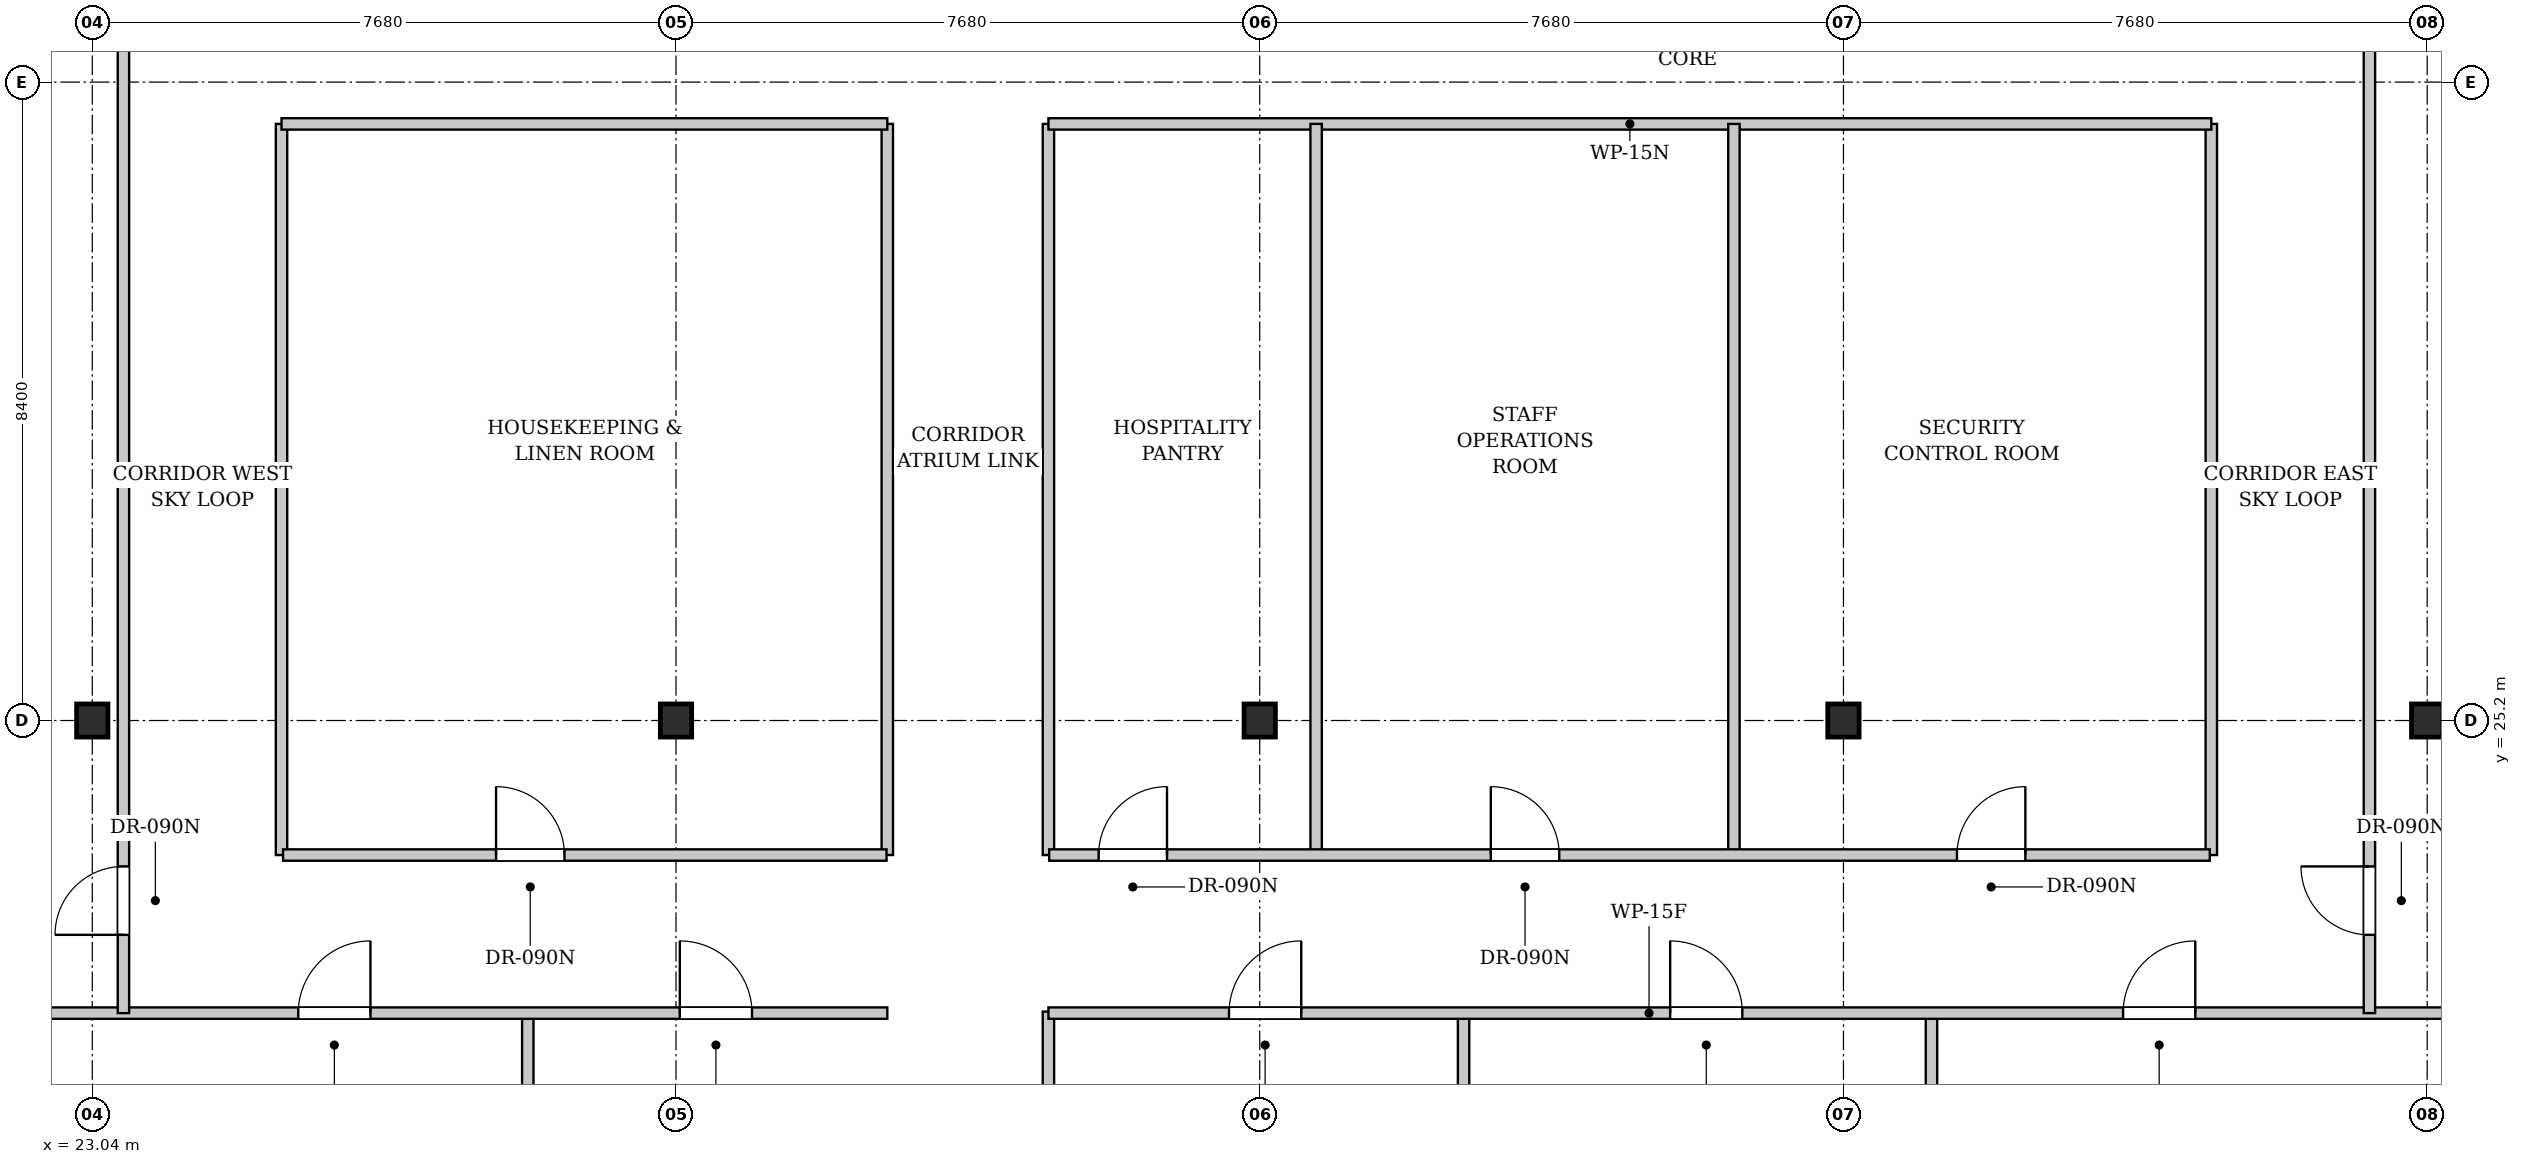
"""IFC4 building model, lengths in metres.
Left out: names, types, materials, properties, quantities, classifications, styles, units other than length and angle.
Written with IfcOpenShell. Run it as: python <this file> out.ifc"""

import sys

from ifc_helpers import new_model, si_unit, direction, frame, frame_2d, origin, origin_2d, place, context, subcontext, project, spatial, rectangle, i_section, extrude, element, fill, save


model = new_model("IFC4")
c1 = context("Model", 3, precision=1e-05, world=origin(), true_north=direction((0.0, 1.0)))
c2 = subcontext(c1, "Body", "Model", "MODEL_VIEW")
j1 = project(units=[si_unit("LENGTHUNIT", "METRE"), si_unit("PLANEANGLEUNIT", "RADIAN")], contexts=[c1])
p1 = place(None, origin())
s1 = spatial("IfcSite", under=j1, at=p1, CompositionType="ELEMENT")
p2 = place(p1, origin())
s2 = spatial("IfcBuilding", under=s1, at=p2, CompositionType="ELEMENT")
p3 = place(p2, frame((0.0, 0.0, 227.6)))
s3 = spatial("IfcBuildingStorey", under=s2, at=p3, CompositionType="ELEMENT", Elevation=227.6)
for number, where, z_axis, x_axis in (
    (1, (23.04, 25.2, 0.0), (0.0, 0.0, 1.0), (1.0, 0.0, 0.0)),
    (2, (30.72, 25.2, 0.0), (0.0, 0.0, 1.0), (1.0, 0.0, 0.0)),
    (3, (38.4, 25.2, 0.0), (0.0, 0.0, 1.0), (1.0, 0.0, 0.0)),
    (4, (46.08, 25.2, 0.0), (0.0, 0.0, 1.0), (1.0, 0.0, 0.0)),
    (5, (53.76, 25.2, 0.0), (0.0, 0.0, 1.0), (1.0, 0.0, 0.0)),
):
    element("IfcColumn", number, at=place(p3, frame(where, z_axis=z_axis, x_axis=x_axis)), inside=s3, PredefinedType="COLUMN", context=c2, shape_type="SweptSolid", body=[
        extrude(i_section(OverallWidth=0.412, OverallDepth=0.435, WebThickness=0.036, FlangeThickness=0.058, FilletRadius=0.015, at=origin_2d()), origin(), (0.0, 0.0, 1.0), 3.3),
    ])
p4 = place(p3, frame((28.77, 12.891, 0.0), z_axis=(0.0, 0.0, 1.0), x_axis=(0.0, 1.0, 0.0)))
e6 = element("IfcWall", 6, at=p4, inside=s3, PredefinedType="PARTITIONING", context=c2, shape_type="SweptSolid", body=[
    extrude(rectangle(XDim=8.479, YDim=0.15, at=frame_2d((4.24, 0.0))), origin(), (0.0, 0.0, 1.0), 3.08),
])
p5 = place(p3, frame((35.62, 13.611, 0.0), z_axis=(0.0, 0.0, 1.0), x_axis=(0.0, 1.0, 0.0)))
e7 = element("IfcWall", 7, at=p5, inside=s3, PredefinedType="PARTITIONING", context=c2, shape_type="SweptSolid", body=[
    extrude(rectangle(XDim=7.76, YDim=0.15, at=frame_2d((3.88, 0.0))), origin(), (0.0, 0.0, 1.0), 3.08),
])
p6 = place(p3, frame((41.082, 14.185, 0.0), z_axis=(0.0, 0.0, 1.0), x_axis=(0.0, 1.0, 0.0)))
e8 = element("IfcWall", 8, at=p6, inside=s3, PredefinedType="PARTITIONING", context=c2, shape_type="SweptSolid", body=[
    extrude(rectangle(XDim=7.186, YDim=0.15, at=frame_2d((3.593, 0.0))), origin(), (0.0, 0.0, 1.0), 3.08),
])
p7 = place(p3, frame((47.238, 14.832, 0.0), z_axis=(0.0, 0.0, 1.0), x_axis=(0.0, 1.0, 0.0)))
e9 = element("IfcWall", 9, at=p7, inside=s3, PredefinedType="PARTITIONING", context=c2, shape_type="SweptSolid", body=[
    extrude(rectangle(XDim=6.538, YDim=0.15, at=frame_2d((3.269, 0.0))), origin(), (0.0, 0.0, 1.0), 3.08),
])
p8 = place(p3, frame((17.703, 21.35, 0.0), z_axis=(0.0, 0.0, 1.0), x_axis=(1.0, 0.0, 0.0)))
e10 = element("IfcWall", 10, at=p8, inside=s3, PredefinedType="PARTITIONING", context=c2, shape_type="SweptSolid", body=[
    extrude(rectangle(XDim=15.797, YDim=0.15, at=frame_2d((7.898, 0.0))), origin(), (0.0, 0.0, 1.0), 3.08),
])
p9 = place(p8, frame((8.047, 0.0, 0.0)))
e11 = element("IfcOpeningElement", 11, at=p9, cuts=e10, PredefinedType="OPENING", context=c2, shape_type="SweptSolid", body=[
    extrude(rectangle(XDim=0.95, YDim=2.15, at=frame_2d((0.475, 1.075))), frame((0.0, 0.085, 0.0), z_axis=(0.0, -1.0, 0.0), x_axis=(1.0, 0.0, 0.0)), (0.0, 0.0, 1.0), 0.17),
])
p10 = place(p8, frame((13.067, 0.0, 0.0)))
e12 = element("IfcOpeningElement", 12, at=p10, cuts=e10, PredefinedType="OPENING", context=c2, shape_type="SweptSolid", body=[
    extrude(rectangle(XDim=0.95, YDim=2.15, at=frame_2d((0.475, 1.075))), frame((0.0, 0.085, 0.0), z_axis=(0.0, -1.0, 0.0), x_axis=(1.0, 0.0, 0.0)), (0.0, 0.0, 1.0), 0.17),
])
p11 = place(p3, frame((35.62, 21.35, 0.0), z_axis=(0.0, 0.0, 1.0), x_axis=(1.0, 0.0, 0.0)))
e13 = element("IfcWall", 13, at=p11, inside=s3, PredefinedType="PARTITIONING", context=c2, shape_type="SweptSolid", body=[
    extrude(rectangle(XDim=35.918, YDim=0.15, at=frame_2d((17.959, 0.0))), origin(), (0.0, 0.0, 1.0), 3.08),
])
p12 = place(p11, frame((2.376, 0.0, 0.0)))
e14 = element("IfcOpeningElement", 14, at=p12, cuts=e13, PredefinedType="OPENING", context=c2, shape_type="SweptSolid", body=[
    extrude(rectangle(XDim=0.95, YDim=2.15, at=frame_2d((0.475, 1.075))), frame((0.0, 0.085, 0.0), z_axis=(0.0, -1.0, 0.0), x_axis=(1.0, 0.0, 0.0)), (0.0, 0.0, 1.0), 0.17),
])
p13 = place(p11, frame((8.18, 0.0, 0.0)))
e15 = element("IfcOpeningElement", 15, at=p13, cuts=e13, PredefinedType="OPENING", context=c2, shape_type="SweptSolid", body=[
    extrude(rectangle(XDim=0.95, YDim=2.15, at=frame_2d((0.475, 1.075))), frame((0.0, 0.085, 0.0), z_axis=(0.0, -1.0, 0.0), x_axis=(1.0, 0.0, 0.0)), (0.0, 0.0, 1.0), 0.17),
])
p14 = place(p11, frame((14.139, 0.0, 0.0)))
e16 = element("IfcOpeningElement", 16, at=p14, cuts=e13, PredefinedType="OPENING", context=c2, shape_type="SweptSolid", body=[
    extrude(rectangle(XDim=0.95, YDim=2.15, at=frame_2d((0.475, 1.075))), frame((0.0, 0.085, 0.0), z_axis=(0.0, -1.0, 0.0), x_axis=(1.0, 0.0, 0.0)), (0.0, 0.0, 1.0), 0.17),
])
p15 = place(p3, frame((23.45, 21.35, 0.0), z_axis=(0.0, 0.0, 1.0), x_axis=(0.0, 1.0, 0.0)))
e17 = element("IfcWall", 17, at=p15, inside=s3, PredefinedType="PARTITIONING", context=c2, shape_type="SweptSolid", body=[
    extrude(rectangle(XDim=13.79, YDim=0.15, at=frame_2d((6.895, 0.0))), origin(), (0.0, 0.0, 1.0), 3.08),
])
p16 = place(p15, frame((1.03, 0.0, 0.0)))
e18 = element("IfcOpeningElement", 18, at=p16, cuts=e17, PredefinedType="OPENING", context=c2, shape_type="SweptSolid", body=[
    extrude(rectangle(XDim=0.9, YDim=2.15, at=frame_2d((0.45, 1.075))), frame((0.0, 0.085, 0.0), z_axis=(0.0, -1.0, 0.0), x_axis=(1.0, 0.0, 0.0)), (0.0, 0.0, 1.0), 0.17),
])
p17 = place(p3, frame((53.0, 21.35, 0.0), z_axis=(0.0, 0.0, 1.0), x_axis=(0.0, 1.0, 0.0)))
e19 = element("IfcWall", 19, at=p17, inside=s3, PredefinedType="PARTITIONING", context=c2, shape_type="SweptSolid", body=[
    extrude(rectangle(XDim=13.79, YDim=0.15, at=frame_2d((6.895, 0.0))), origin(), (0.0, 0.0, 1.0), 3.08),
])
p18 = place(p17, frame((1.03, 0.0, 0.0)))
e20 = element("IfcOpeningElement", 20, at=p18, cuts=e19, PredefinedType="OPENING", context=c2, shape_type="SweptSolid", body=[
    extrude(rectangle(XDim=0.9, YDim=2.15, at=frame_2d((0.45, 1.075))), frame((0.0, 0.085, 0.0), z_axis=(0.0, -1.0, 0.0), x_axis=(1.0, 0.0, 0.0)), (0.0, 0.0, 1.0), 0.17),
])
for number, where, z_axis, x_axis in (
    (21, (25.53, 23.43, 0.0), (0.0, 0.0, 1.0), (0.0, 1.0, 0.0)),
    (22, (50.92, 23.43, 0.0), (0.0, 0.0, 1.0), (0.0, 1.0, 0.0)),
    (23, (33.5, 23.43, 0.0), (0.0, 0.0, 1.0), (0.0, 1.0, 0.0)),
    (24, (35.62, 23.43, 0.0), (0.0, 0.0, 1.0), (0.0, 1.0, 0.0)),
):
    element("IfcWall", number, at=place(p3, frame(where, z_axis=z_axis, x_axis=x_axis)), inside=s3, PredefinedType="PARTITIONING", context=c2, shape_type="SweptSolid", body=[
        extrude(rectangle(XDim=9.62, YDim=0.15, at=frame_2d((4.81, 0.0))), origin(), (0.0, 0.0, 1.0), 3.08),
    ])
p19 = place(p3, frame((25.53, 33.05, 0.0), z_axis=(0.0, 0.0, 1.0), x_axis=(1.0, 0.0, 0.0)))
e25 = element("IfcWall", 25, at=p19, inside=s3, PredefinedType="PARTITIONING", context=c2, shape_type="SweptSolid", body=[
    extrude(rectangle(XDim=7.97, YDim=0.15, at=frame_2d((3.985, 0.0))), origin(), (0.0, 0.0, 1.0), 3.08),
])
p20 = place(p3, frame((35.62, 33.05, 0.0), z_axis=(0.0, 0.0, 1.0), x_axis=(1.0, 0.0, 0.0)))
e26 = element("IfcWall", 26, at=p20, inside=s3, PredefinedType="PARTITIONING", context=c2, shape_type="SweptSolid", body=[
    extrude(rectangle(XDim=15.3, YDim=0.15, at=frame_2d((7.65, 0.0))), origin(), (0.0, 0.0, 1.0), 3.08),
])
p21 = place(p3, frame((25.55, 23.43, 0.0), z_axis=(0.0, 0.0, 1.0), x_axis=(1.0, 0.0, 0.0)))
e27 = element("IfcWall", 27, at=p21, inside=s3, PredefinedType="PARTITIONING", context=c2, shape_type="SweptSolid", body=[
    extrude(rectangle(XDim=7.94, YDim=0.15, at=frame_2d((3.97, 0.0))), origin(), (0.0, 0.0, 1.0), 2.715),
])
p22 = place(p21, frame((2.802, 0.0, 0.0)))
e28 = element("IfcOpeningElement", 28, at=p22, cuts=e27, PredefinedType="OPENING", context=c2, shape_type="SweptSolid", body=[
    extrude(rectangle(XDim=0.9, YDim=2.15, at=frame_2d((0.45, 1.075))), frame((0.0, 0.085, 0.0), z_axis=(0.0, -1.0, 0.0), x_axis=(1.0, 0.0, 0.0)), (0.0, 0.0, 1.0), 0.17),
])
for number, where, z_axis, x_axis in (
    (29, (39.142, 23.43, 0.0), (0.0, 0.0, 1.0), (0.0, 1.0, 0.0)),
    (30, (44.639, 23.43, 0.0), (0.0, 0.0, 1.0), (0.0, 1.0, 0.0)),
):
    element("IfcWall", number, at=place(p3, frame(where, z_axis=z_axis, x_axis=x_axis)), inside=s3, PredefinedType="PARTITIONING", context=c2, shape_type="SweptSolid", body=[
        extrude(rectangle(XDim=9.62, YDim=0.15, at=frame_2d((4.81, 0.0))), origin(), (0.0, 0.0, 1.0), 3.08),
    ])
p23 = place(p3, frame((35.63, 23.43, 0.0), z_axis=(0.0, 0.0, 1.0), x_axis=(1.0, 0.0, 0.0)))
e31 = element("IfcWall", 31, at=p23, inside=s3, PredefinedType="PARTITIONING", context=c2, shape_type="SweptSolid", body=[
    extrude(rectangle(XDim=15.27, YDim=0.15, at=frame_2d((7.635, 0.0))), origin(), (0.0, 0.0, 1.0), 2.715),
])
p24 = place(p23, frame((0.65, 0.0, 0.0)))
e32 = element("IfcOpeningElement", 32, at=p24, cuts=e31, PredefinedType="OPENING", context=c2, shape_type="SweptSolid", body=[
    extrude(rectangle(XDim=0.9, YDim=2.15, at=frame_2d((0.45, 1.075))), frame((0.0, 0.085, 0.0), z_axis=(0.0, -1.0, 0.0), x_axis=(1.0, 0.0, 0.0)), (0.0, 0.0, 1.0), 0.17),
])
p25 = place(p23, frame((5.811, 0.0, 0.0)))
e33 = element("IfcOpeningElement", 33, at=p25, cuts=e31, PredefinedType="OPENING", context=c2, shape_type="SweptSolid", body=[
    extrude(rectangle(XDim=0.9, YDim=2.15, at=frame_2d((0.45, 1.075))), frame((0.0, 0.085, 0.0), z_axis=(0.0, -1.0, 0.0), x_axis=(1.0, 0.0, 0.0)), (0.0, 0.0, 1.0), 0.17),
])
p26 = place(p23, frame((11.943, 0.0, 0.0)))
e34 = element("IfcOpeningElement", 34, at=p26, cuts=e31, PredefinedType="OPENING", context=c2, shape_type="SweptSolid", body=[
    extrude(rectangle(XDim=0.9, YDim=2.15, at=frame_2d((0.45, 1.075))), frame((0.0, 0.085, 0.0), z_axis=(0.0, -1.0, 0.0), x_axis=(1.0, 0.0, 0.0)), (0.0, 0.0, 1.0), 0.17),
])
p27 = place(p9, origin())
e35 = element("IfcDoor", 35, at=p27, inside=s3, OperationType="SINGLE_SWING_RIGHT", PredefinedType="DOOR", context=c2, shape_type="SweptSolid", body=[
    extrude(rectangle(XDim=0.95, YDim=2.15, at=frame_2d((0.475, 1.075))), frame((0.0, 0.025, 0.0), z_axis=(0.0, -1.0, 0.0), x_axis=(1.0, 0.0, 0.0)), (0.0, 0.0, 1.0), 0.05),
])
fill(e11, e35)
p28 = place(p10, origin())
e36 = element("IfcDoor", 36, at=p28, inside=s3, OperationType="SINGLE_SWING_LEFT", PredefinedType="DOOR", context=c2, shape_type="SweptSolid", body=[
    extrude(rectangle(XDim=0.95, YDim=2.15, at=frame_2d((0.475, 1.075))), frame((0.0, 0.025, 0.0), z_axis=(0.0, -1.0, 0.0), x_axis=(1.0, 0.0, 0.0)), (0.0, 0.0, 1.0), 0.05),
])
fill(e12, e36)
p29 = place(p12, origin())
e37 = element("IfcDoor", 37, at=p29, inside=s3, OperationType="SINGLE_SWING_RIGHT", PredefinedType="DOOR", context=c2, shape_type="SweptSolid", body=[
    extrude(rectangle(XDim=0.95, YDim=2.15, at=frame_2d((0.475, 1.075))), frame((0.0, 0.025, 0.0), z_axis=(0.0, -1.0, 0.0), x_axis=(1.0, 0.0, 0.0)), (0.0, 0.0, 1.0), 0.05),
])
fill(e14, e37)
p30 = place(p13, origin())
e38 = element("IfcDoor", 38, at=p30, inside=s3, OperationType="SINGLE_SWING_LEFT", PredefinedType="DOOR", context=c2, shape_type="SweptSolid", body=[
    extrude(rectangle(XDim=0.95, YDim=2.15, at=frame_2d((0.475, 1.075))), frame((0.0, 0.025, 0.0), z_axis=(0.0, -1.0, 0.0), x_axis=(1.0, 0.0, 0.0)), (0.0, 0.0, 1.0), 0.05),
])
fill(e15, e38)
p31 = place(p14, origin())
e39 = element("IfcDoor", 39, at=p31, inside=s3, OperationType="SINGLE_SWING_RIGHT", PredefinedType="DOOR", context=c2, shape_type="SweptSolid", body=[
    extrude(rectangle(XDim=0.95, YDim=2.15, at=frame_2d((0.475, 1.075))), frame((0.0, 0.025, 0.0), z_axis=(0.0, -1.0, 0.0), x_axis=(1.0, 0.0, 0.0)), (0.0, 0.0, 1.0), 0.05),
])
fill(e16, e39)
p32 = place(p16, origin())
e40 = element("IfcDoor", 40, at=p32, inside=s3, OperationType="SINGLE_SWING_LEFT", PredefinedType="DOOR", context=c2, shape_type="SweptSolid", body=[
    extrude(rectangle(XDim=0.9, YDim=2.15, at=frame_2d((0.45, 1.075))), frame((0.0, 0.025, 0.0), z_axis=(0.0, -1.0, 0.0), x_axis=(1.0, 0.0, 0.0)), (0.0, 0.0, 1.0), 0.05),
])
fill(e18, e40)
p33 = place(p18, origin())
e41 = element("IfcDoor", 41, at=p33, inside=s3, OperationType="SINGLE_SWING_RIGHT", PredefinedType="DOOR", context=c2, shape_type="SweptSolid", body=[
    extrude(rectangle(XDim=0.9, YDim=2.15, at=frame_2d((0.45, 1.075))), frame((0.0, 0.025, 0.0), z_axis=(0.0, -1.0, 0.0), x_axis=(1.0, 0.0, 0.0)), (0.0, 0.0, 1.0), 0.05),
])
fill(e20, e41)
p34 = place(p22, origin())
e42 = element("IfcDoor", 42, at=p34, inside=s3, OperationType="SINGLE_SWING_LEFT", PredefinedType="DOOR", context=c2, shape_type="SweptSolid", body=[
    extrude(rectangle(XDim=0.9, YDim=2.15, at=frame_2d((0.45, 1.075))), frame((0.0, 0.025, 0.0), z_axis=(0.0, -1.0, 0.0), x_axis=(1.0, 0.0, 0.0)), (0.0, 0.0, 1.0), 0.05),
])
fill(e28, e42)
p35 = place(p24, origin())
e43 = element("IfcDoor", 43, at=p35, inside=s3, OperationType="SINGLE_SWING_RIGHT", PredefinedType="DOOR", context=c2, shape_type="SweptSolid", body=[
    extrude(rectangle(XDim=0.9, YDim=2.15, at=frame_2d((0.45, 1.075))), frame((0.0, 0.025, 0.0), z_axis=(0.0, -1.0, 0.0), x_axis=(1.0, 0.0, 0.0)), (0.0, 0.0, 1.0), 0.05),
])
fill(e32, e43)
p36 = place(p25, origin())
e44 = element("IfcDoor", 44, at=p36, inside=s3, OperationType="SINGLE_SWING_LEFT", PredefinedType="DOOR", context=c2, shape_type="SweptSolid", body=[
    extrude(rectangle(XDim=0.9, YDim=2.15, at=frame_2d((0.45, 1.075))), frame((0.0, 0.025, 0.0), z_axis=(0.0, -1.0, 0.0), x_axis=(1.0, 0.0, 0.0)), (0.0, 0.0, 1.0), 0.05),
])
fill(e33, e44)
p37 = place(p26, origin())
e45 = element("IfcDoor", 45, at=p37, inside=s3, OperationType="SINGLE_SWING_RIGHT", PredefinedType="DOOR", context=c2, shape_type="SweptSolid", body=[
    extrude(rectangle(XDim=0.9, YDim=2.15, at=frame_2d((0.45, 1.075))), frame((0.0, 0.025, 0.0), z_axis=(0.0, -1.0, 0.0), x_axis=(1.0, 0.0, 0.0)), (0.0, 0.0, 1.0), 0.05),
])
fill(e34, e45)
save(model, sys.argv[1])
